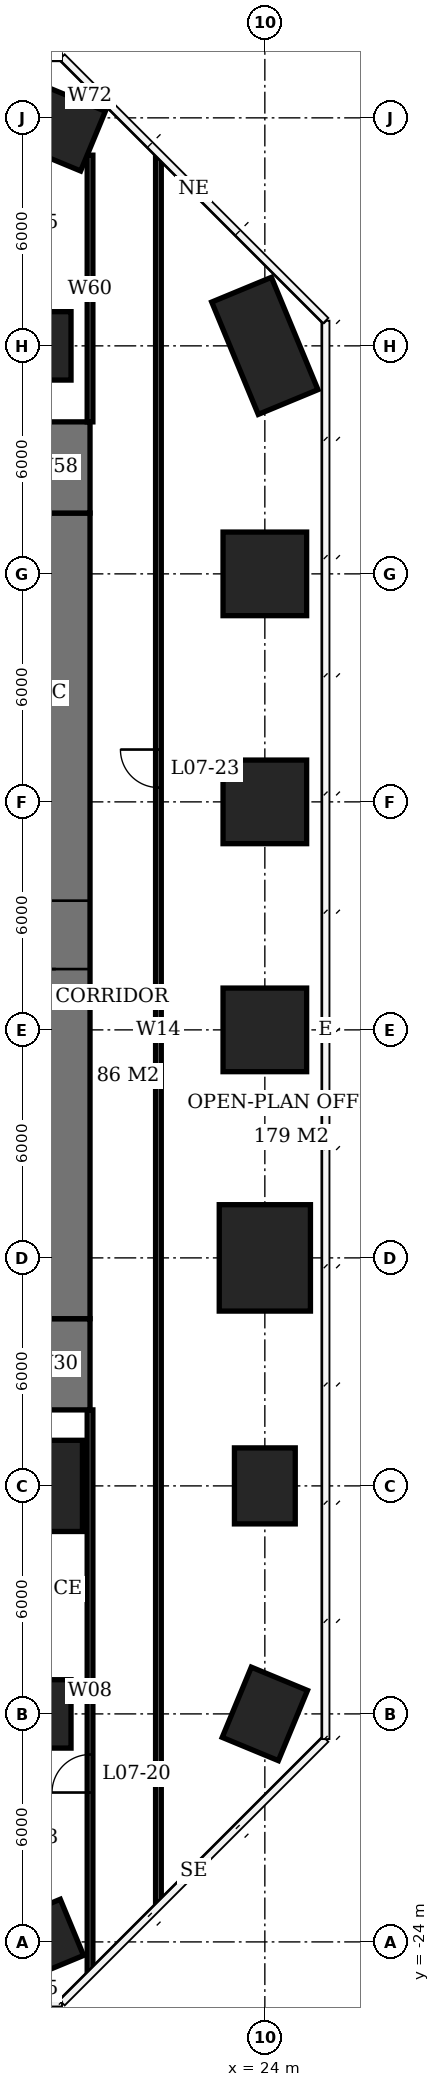
"""IFC4 building model, lengths in metres.
Left out: names, types, materials, properties, quantities, classifications, styles, units other than length and angle.
Written with IfcOpenShell. Run it as: python <this file> out.ifc"""

import sys

from ifc_helpers import new_model, si_unit, direction, frame, frame_2d, origin, origin_2d, place, context, subcontext, project, spatial, rectangle, extrude, element, fill, save


model = new_model("IFC4")
c1 = context("Model", 3, precision=1e-05, world=origin(), true_north=direction((0.0, 1.0)))
c2 = subcontext(c1, "Body", "Model", "MODEL_VIEW")
j1 = project(units=[si_unit("LENGTHUNIT", "METRE"), si_unit("PLANEANGLEUNIT", "RADIAN")], contexts=[c1])
p1 = place(None, origin())
s1 = spatial("IfcSite", under=j1, at=p1, CompositionType="ELEMENT")
p2 = place(p1, origin())
s2 = spatial("IfcBuilding", under=s1, at=p2, CompositionType="ELEMENT")
p3 = place(p2, frame((0.0, 0.0, 33.8)))
s3 = spatial("IfcBuildingStorey", under=s2, at=p3, CompositionType="ELEMENT", Elevation=33.8)
p4 = place(p3, frame((18.0, -24.0, 0.0), z_axis=(0.0, 0.0, 1.0), x_axis=(-0.923879532511, -0.382683432365, 0.0)))
e1 = element("IfcColumn", 1, at=p4, inside=s3, PredefinedType="COLUMN", context=c2, shape_type="SweptSolid", body=[
    extrude(rectangle(XDim=2.0, YDim=1.6, at=origin_2d()), origin(), (0.0, 0.0, 1.0), 3.9),
])
p5 = place(p3, frame((18.0, -18.0, 0.0), z_axis=(0.0, 0.0, 1.0), x_axis=(1.0, 0.0, 0.0)))
e2 = element("IfcColumn", 2, at=p5, inside=s3, PredefinedType="COLUMN", context=c2, shape_type="SweptSolid", body=[
    extrude(rectangle(XDim=1.8, YDim=1.8, at=origin_2d()), origin(), (0.0, 0.0, 1.0), 3.9),
])
p6 = place(p3, frame((18.0, -12.0, 0.0), z_axis=(0.0, 0.0, 1.0), x_axis=(1.0, 0.0, 0.0)))
e3 = element("IfcColumn", 3, at=p6, inside=s3, PredefinedType="COLUMN", context=c2, shape_type="SweptSolid", body=[
    extrude(rectangle(XDim=2.4, YDim=2.4, at=origin_2d()), origin(), (0.0, 0.0, 1.0), 3.9),
])
p7 = place(p3, frame((18.0, 18.0, 0.0), z_axis=(0.0, 0.0, 1.0), x_axis=(1.0, 0.0, 0.0)))
e4 = element("IfcColumn", 4, at=p7, inside=s3, PredefinedType="COLUMN", context=c2, shape_type="SweptSolid", body=[
    extrude(rectangle(XDim=1.8, YDim=1.8, at=origin_2d()), origin(), (0.0, 0.0, 1.0), 3.9),
])
p8 = place(p3, frame((18.0, 24.0, 0.0), z_axis=(0.0, 0.0, 1.0), x_axis=(0.923879532511, -0.382683432365, 0.0)))
e5 = element("IfcColumn", 5, at=p8, inside=s3, PredefinedType="COLUMN", context=c2, shape_type="SweptSolid", body=[
    extrude(rectangle(XDim=3.2, YDim=1.7, at=origin_2d()), origin(), (0.0, 0.0, 1.0), 3.9),
])
for number, where, z_axis, x_axis in (
    (6, (24.0, -18.0, 0.0), (0.0, 0.0, 1.0), (-0.383, -0.924, 0.0)),
    (7, (24.0, -12.0, 0.0), (0.0, 0.0, 1.0), (0.0, 1.0, 0.0)),
):
    element("IfcColumn", number, at=place(p3, frame(where, z_axis=z_axis, x_axis=x_axis)), inside=s3, PredefinedType="COLUMN", context=c2, shape_type="SweptSolid", body=[
        extrude(rectangle(XDim=2.0, YDim=1.6, at=origin_2d()), origin(), (0.0, 0.0, 1.0), 3.9),
    ])
p9 = place(p3, frame((24.0, -6.0, 0.0), z_axis=(0.0, 0.0, 1.0), x_axis=(0.0, 1.0, 0.0)))
e8 = element("IfcColumn", 8, at=p9, inside=s3, PredefinedType="COLUMN", context=c2, shape_type="SweptSolid", body=[
    extrude(rectangle(XDim=2.8, YDim=2.4, at=origin_2d()), origin(), (0.0, 0.0, 1.0), 3.9),
])
for number, where, z_axis, x_axis in (
    (9, (24.0, 0.0, 0.0), (0.0, 0.0, 1.0), (1.0, 0.0, 0.0)),
    (10, (24.0, 6.0, 0.0), (0.0, 0.0, 1.0), (1.0, 0.0, 0.0)),
    (11, (24.0, 12.0, 0.0), (0.0, 0.0, 1.0), (1.0, 0.0, 0.0)),
):
    element("IfcColumn", number, at=place(p3, frame(where, z_axis=z_axis, x_axis=x_axis)), inside=s3, PredefinedType="COLUMN", context=c2, shape_type="SweptSolid", body=[
        extrude(rectangle(XDim=2.2, YDim=2.2, at=origin_2d()), origin(), (0.0, 0.0, 1.0), 3.9),
    ])
p10 = place(p3, frame((24.0, 18.0, 0.0), z_axis=(0.0, 0.0, 1.0), x_axis=(0.382683432365, -0.923879532511, 0.0)))
e12 = element("IfcColumn", 12, at=p10, inside=s3, PredefinedType="COLUMN", context=c2, shape_type="SweptSolid", body=[
    extrude(rectangle(XDim=3.2, YDim=1.7, at=origin_2d()), origin(), (0.0, 0.0, 1.0), 3.9),
])
p11 = place(p3, frame((18.5, -7.6, 0.0), z_axis=(0.0, 0.0, 1.0), x_axis=(0.0, 1.0, 0.0)))
e13 = element("IfcWall", 13, at=p11, inside=s3, PredefinedType="SHEAR", context=c2, shape_type="SweptSolid", body=[
    extrude(rectangle(XDim=21.2, YDim=1.8, at=frame_2d((10.6, 0.0))), origin(), (0.0, 0.0, 1.0), 3.9),
])
p12 = place(p11, frame((9.2, 0.0, 0.0)))
e14 = element("IfcOpeningElement", 14, at=p12, cuts=e13, PredefinedType="OPENING", context=c2, shape_type="SweptSolid", body=[
    extrude(rectangle(XDim=1.8, YDim=2.4, at=frame_2d((0.9, 1.2))), frame((0.0, 0.91, 0.0), z_axis=(0.0, -1.0, 0.0), x_axis=(1.0, 0.0, 0.0)), (0.0, 0.0, 1.0), 1.82),
])
for number, where, z_axis, x_axis in (
    (15, (18.5, -10.0, 0.0), (0.0, 0.0, 1.0), (0.0, 1.0, 0.0)),
    (16, (18.5, 13.6, 0.0), (0.0, 0.0, 1.0), (0.0, 1.0, 0.0)),
):
    element("IfcWall", number, at=place(p3, frame(where, z_axis=z_axis, x_axis=x_axis)), inside=s3, PredefinedType="SHEAR", context=c2, shape_type="SweptSolid", body=[
        extrude(rectangle(XDim=2.4, YDim=1.8, at=frame_2d((1.2, 0.0))), origin(), (0.0, 0.0, 1.0), 3.9),
    ])
p13 = place(p3, frame((19.4, -24.771, 0.0), z_axis=(0.0, 0.0, 1.0), x_axis=(0.0, 1.0, 0.0)))
e17 = element("IfcWall", 17, at=p13, inside=s3, PredefinedType="PARTITIONING", context=c2, shape_type="SweptSolid", body=[
    extrude(rectangle(XDim=14.771, YDim=0.15, at=frame_2d((7.385, 0.0))), origin(), (0.0, 0.0, 1.0), 3.65),
])
p14 = place(p13, frame((4.702, 0.0, 0.0)))
e18 = element("IfcOpeningElement", 18, at=p14, cuts=e17, PredefinedType="OPENING", context=c2, shape_type="SweptSolid", body=[
    extrude(rectangle(XDim=1.0, YDim=2.1, at=frame_2d((0.5, 1.05))), frame((0.0, 0.085, 0.0), z_axis=(0.0, -1.0, 0.0), x_axis=(1.0, 0.0, 0.0)), (0.0, 0.0, 1.0), 0.17),
])
p15 = place(p3, frame((19.4, 16.0, 0.0), z_axis=(0.0, 0.0, 1.0), x_axis=(0.0, 1.0, 0.0)))
e19 = element("IfcWall", 19, at=p15, inside=s3, PredefinedType="PARTITIONING", context=c2, shape_type="SweptSolid", body=[
    extrude(rectangle(XDim=7.018, YDim=0.15, at=frame_2d((3.509, 0.0))), origin(), (0.0, 0.0, 1.0), 3.65),
])
p16 = place(p3, frame((19.4, 24.371, 0.0), z_axis=(0.0, 0.0, 1.0), x_axis=(0.0, 1.0, 0.0)))
e20 = element("IfcWall", 20, at=p16, inside=s3, PredefinedType="PARTITIONING", context=c2, shape_type="SweptSolid", body=[
    extrude(rectangle(XDim=0.4, YDim=0.15, at=frame_2d((0.2, 0.0))), origin(), (0.0, 0.0, 1.0), 3.65),
])
p17 = place(p3, frame((21.2, -22.971, 0.0), z_axis=(0.0, 0.0, 1.0), x_axis=(0.0, 1.0, 0.0)))
e21 = element("IfcWall", 21, at=p17, inside=s3, PredefinedType="PARTITIONING", context=c2, shape_type="SweptSolid", body=[
    extrude(rectangle(XDim=45.942, YDim=0.15, at=frame_2d((22.971, 0.0))), origin(), (0.0, 0.0, 1.0), 3.65),
])
p18 = place(p17, frame((29.348, 0.0, 0.0)))
e22 = element("IfcOpeningElement", 22, at=p18, cuts=e21, PredefinedType="OPENING", context=c2, shape_type="SweptSolid", body=[
    extrude(rectangle(XDim=1.0, YDim=2.1, at=frame_2d((0.5, 1.05))), frame((0.0, 0.085, 0.0), z_axis=(0.0, -1.0, 0.0), x_axis=(1.0, 0.0, 0.0)), (0.0, 0.0, 1.0), 0.17),
])
p19 = place(p12, origin())
e23 = element("IfcDoor", 23, at=p19, inside=s3, OperationType="DOUBLE_DOOR_SINGLE_SWING", PredefinedType="DOOR", context=c2, shape_type="SweptSolid", body=[
    extrude(rectangle(XDim=1.8, YDim=2.4, at=frame_2d((0.9, 1.2))), frame((0.0, 0.025, 0.0), z_axis=(0.0, -1.0, 0.0), x_axis=(1.0, 0.0, 0.0)), (0.0, 0.0, 1.0), 0.05),
])
fill(e14, e23)
p20 = place(p14, origin())
e24 = element("IfcDoor", 24, at=p20, inside=s3, OperationType="SINGLE_SWING_LEFT", PredefinedType="DOOR", context=c2, shape_type="SweptSolid", body=[
    extrude(rectangle(XDim=1.0, YDim=2.1, at=frame_2d((0.5, 1.05))), frame((0.0, 0.025, 0.0), z_axis=(0.0, -1.0, 0.0), x_axis=(1.0, 0.0, 0.0)), (0.0, 0.0, 1.0), 0.05),
])
fill(e18, e24)
p21 = place(p18, origin())
e25 = element("IfcDoor", 25, at=p21, inside=s3, OperationType="SINGLE_SWING_RIGHT", PredefinedType="DOOR", context=c2, shape_type="SweptSolid", body=[
    extrude(rectangle(XDim=1.0, YDim=2.1, at=frame_2d((0.5, 1.05))), frame((0.0, 0.025, 0.0), z_axis=(0.0, -1.0, 0.0), x_axis=(1.0, 0.0, 0.0)), (0.0, 0.0, 1.0), 0.05),
])
fill(e22, e25)
save(model, sys.argv[1])
